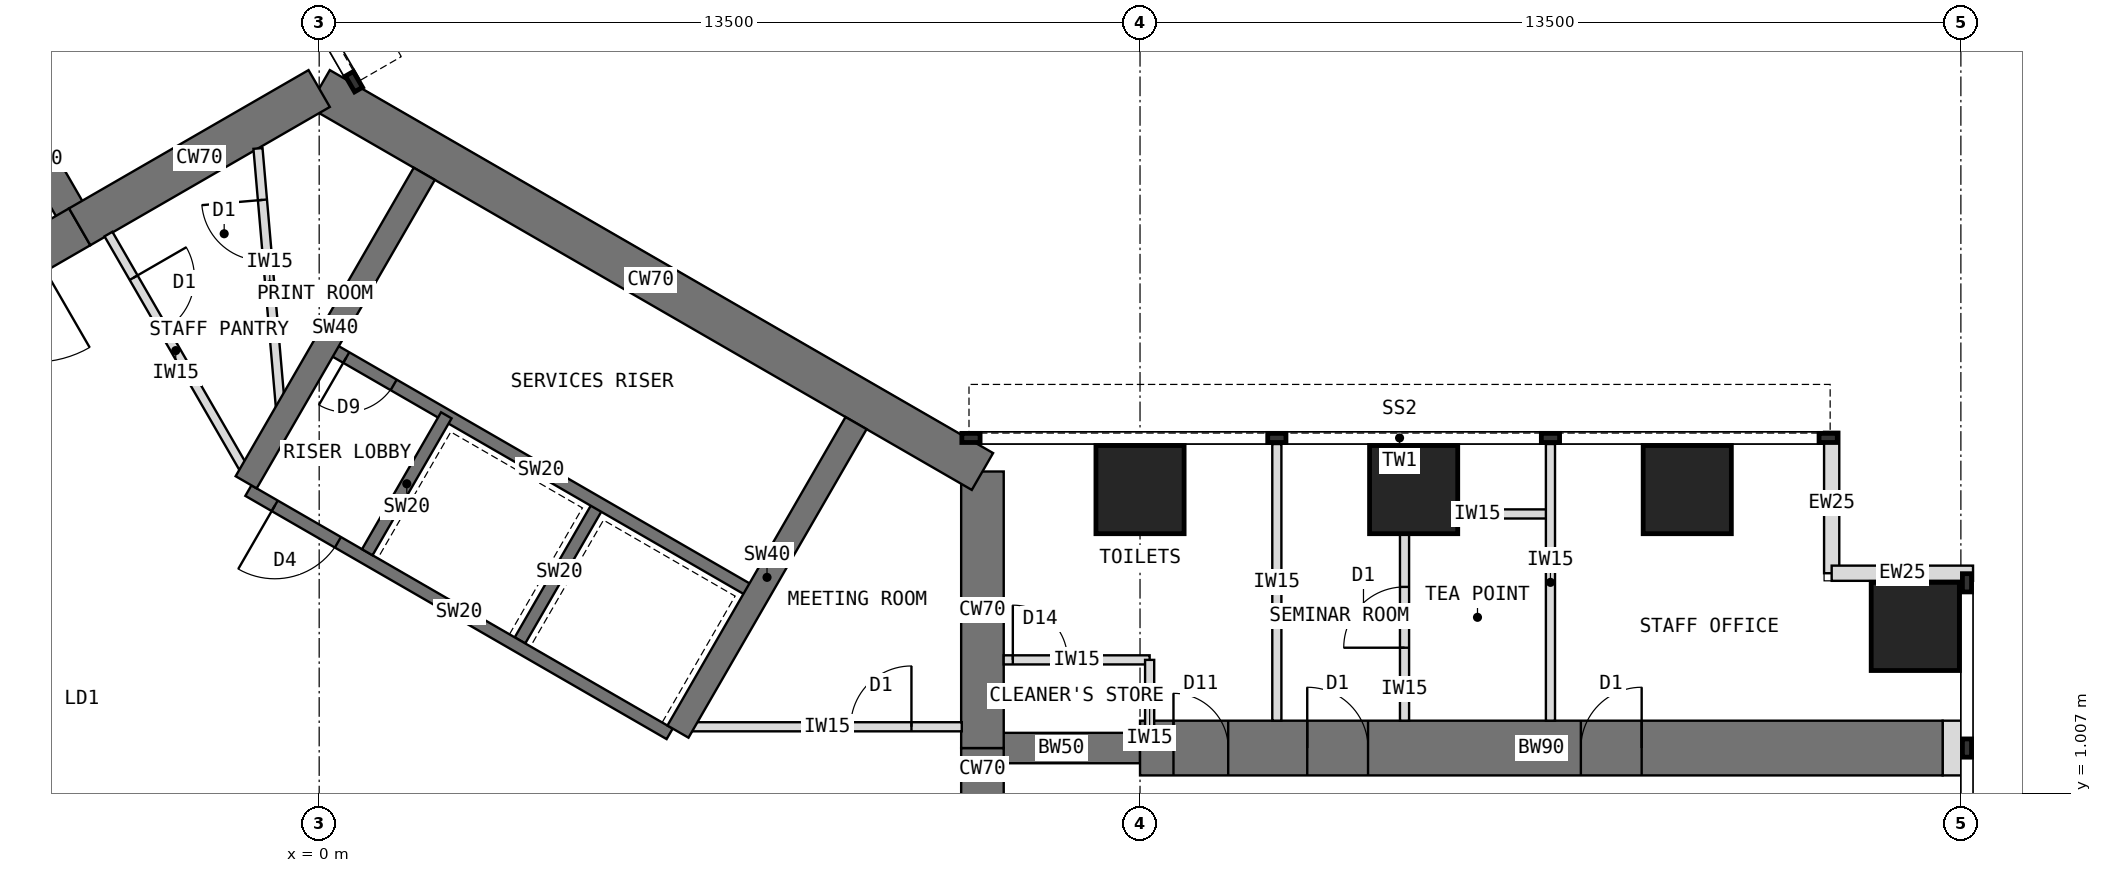
"""IFC4 building model, lengths in metres.
Left out: names, types, materials, properties, quantities, classifications, styles, units other than length and angle.
Written with IfcOpenShell. Run it as: python <this file> out.ifc"""

import sys

from ifc_helpers import new_model, si_unit, direction, frame, frame_2d, origin, origin_2d, place, context, subcontext, project, spatial, rectangle, extrude, element, fill, save


model = new_model("IFC4")
c1 = context("Model", 3, precision=1e-05, world=origin(), true_north=direction((0.0, 1.0)))
c2 = subcontext(c1, "Body", "Model", "MODEL_VIEW")
j1 = project(units=[si_unit("LENGTHUNIT", "METRE"), si_unit("PLANEANGLEUNIT", "RADIAN")], contexts=[c1])
p1 = place(None, origin())
s1 = spatial("IfcSite", under=j1, at=p1, CompositionType="ELEMENT")
p2 = place(p1, origin())
s2 = spatial("IfcBuilding", under=s1, at=p2, CompositionType="ELEMENT")
p3 = place(p2, frame((0.0, 0.0, 60.5)))
s3 = spatial("IfcBuildingStorey", under=s2, at=p3, CompositionType="ELEMENT", Elevation=60.5)
p4 = place(p3, frame((10.908, -1.75, 0.0), z_axis=(0.0, 0.0, 1.0), x_axis=(0.0, 1.0, 0.0)))
e1 = element("IfcWall", 1, at=p4, inside=s3, PredefinedType="SHEAR", context=c2, shape_type="SweptSolid", body=[
    extrude(rectangle(XDim=3.5, YDim=0.7, at=frame_2d((1.75, 0.0))), origin(), (0.0, 0.0, 1.0), 4.0),
])
p5 = place(p4, frame((0.85, 0.0, 0.0)))
e2 = element("IfcOpeningElement", 2, at=p5, cuts=e1, PredefinedType="OPENING", context=c2, shape_type="SweptSolid", body=[
    extrude(rectangle(XDim=1.8, YDim=2.1, at=frame_2d((0.9, 1.05))), frame((0.0, 0.36, 0.0), z_axis=(0.0, -1.0, 0.0), x_axis=(1.0, 0.0, 0.0)), (0.0, 0.0, 1.0), 0.72),
])
p6 = place(p3, frame((10.908, 1.75, 0.0), z_axis=(0.0, 0.0, 1.0), x_axis=(0.0, 1.0, 0.0)))
e3 = element("IfcWall", 3, at=p6, inside=s3, PredefinedType="SHEAR", context=c2, shape_type="SweptSolid", body=[
    extrude(rectangle(XDim=4.548, YDim=0.7, at=frame_2d((2.274, 0.0))), origin(), (0.0, 0.0, 1.0), 4.0),
])
p7 = place(p3, frame((10.908, 6.298, 0.0), z_axis=(0.0, 0.0, 1.0), x_axis=(-0.866021940709, 0.500005998175, 0.0)))
e4 = element("IfcWall", 4, at=p7, inside=s3, PredefinedType="SHEAR", context=c2, shape_type="SweptSolid", body=[
    extrude(rectangle(XDim=12.596, YDim=0.7, at=frame_2d((6.298, 0.0))), origin(), (0.0, 0.0, 1.0), 4.0),
])
p8 = place(p3, frame((0.0, 12.596, 0.0), z_axis=(0.0, 0.0, 1.0), x_axis=(-0.866011268655, -0.500024481964, 0.0)))
e5 = element("IfcWall", 5, at=p8, inside=s3, PredefinedType="SHEAR", context=c2, shape_type="SweptSolid", body=[
    extrude(rectangle(XDim=4.548, YDim=0.7, at=frame_2d((2.274, 0.0))), origin(), (0.0, 0.0, 1.0), 4.0),
])
p9 = place(p3, frame((-3.939, 10.322, 0.0), z_axis=(0.0, 0.0, 1.0), x_axis=(-0.866019471182, -0.500010275428, 0.0)))
e6 = element("IfcWall", 6, at=p9, inside=s3, PredefinedType="SHEAR", context=c2, shape_type="SweptSolid", body=[
    extrude(rectangle(XDim=3.5, YDim=0.7, at=frame_2d((1.75, 0.0))), origin(), (0.0, 0.0, 1.0), 4.0),
])
p10 = place(p9, frame((0.85, 0.0, 0.0)))
e7 = element("IfcOpeningElement", 7, at=p10, cuts=e6, PredefinedType="OPENING", context=c2, shape_type="SweptSolid", body=[
    extrude(rectangle(XDim=1.8, YDim=2.1, at=frame_2d((0.9, 1.05))), frame((0.0, 0.36, 0.0), z_axis=(0.0, -1.0, 0.0), x_axis=(1.0, 0.0, 0.0)), (0.0, 0.0, 1.0), 0.72),
])
p11 = place(p3, frame((10.908, 1.75, 0.0), z_axis=(0.0, 0.0, 1.0), x_axis=(1.0, 0.0, 0.0)))
e8 = element("IfcWall", 8, at=p11, inside=s3, PredefinedType="SHEAR", context=c2, shape_type="SweptSolid", body=[
    extrude(rectangle(XDim=2.592, YDim=0.5, at=frame_2d((1.296, 0.0))), origin(), (0.0, 0.0, 1.0), 4.0),
])
p12 = place(p3, frame((13.5, 1.75, 0.0), z_axis=(0.0, 0.0, 1.0), x_axis=(1.0, 0.0, 0.0)))
e9 = element("IfcWall", 9, at=p12, inside=s3, PredefinedType="SHEAR", context=c2, shape_type="SweptSolid", body=[
    extrude(rectangle(XDim=13.2, YDim=0.9, at=frame_2d((6.6, 0.0))), origin(), (0.0, 0.0, 1.0), 4.0),
])
p13 = place(p12, frame((0.55, 0.0, 0.0)))
e10 = element("IfcOpeningElement", 10, at=p13, cuts=e9, PredefinedType="OPENING", context=c2, shape_type="SweptSolid", body=[
    extrude(rectangle(XDim=0.9, YDim=2.1, at=frame_2d((0.45, 1.05))), frame((0.0, 0.46, 0.0), z_axis=(0.0, -1.0, 0.0), x_axis=(1.0, 0.0, 0.0)), (0.0, 0.0, 1.0), 0.92),
])
p14 = place(p12, frame((2.75, 0.0, 0.0)))
e11 = element("IfcOpeningElement", 11, at=p14, cuts=e9, PredefinedType="OPENING", context=c2, shape_type="SweptSolid", body=[
    extrude(rectangle(XDim=1.0, YDim=2.1, at=frame_2d((0.5, 1.05))), frame((0.0, 0.46, 0.0), z_axis=(0.0, -1.0, 0.0), x_axis=(1.0, 0.0, 0.0)), (0.0, 0.0, 1.0), 0.92),
])
p15 = place(p12, frame((7.25, 0.0, 0.0)))
e12 = element("IfcOpeningElement", 12, at=p15, cuts=e9, PredefinedType="OPENING", context=c2, shape_type="SweptSolid", body=[
    extrude(rectangle(XDim=1.0, YDim=2.1, at=frame_2d((0.5, 1.05))), frame((0.0, 0.46, 0.0), z_axis=(0.0, -1.0, 0.0), x_axis=(1.0, 0.0, 0.0)), (0.0, 0.0, 1.0), 0.92),
])
p16 = place(p3, frame((-3.939, 10.322, 0.0), z_axis=(0.0, 0.0, 1.0), x_axis=(-0.499918158782, 0.866072649678, 0.0)))
e13 = element("IfcWall", 13, at=p16, inside=s3, PredefinedType="SHEAR", context=c2, shape_type="SweptSolid", body=[
    extrude(rectangle(XDim=2.592, YDim=0.5, at=frame_2d((1.296, 0.0))), origin(), (0.0, 0.0, 1.0), 4.0),
])
for number, where, z_axis, x_axis in (
    (14, (13.5, 6.0, 0.0), (0.0, 0.0, 1.0), (1.0, 0.0, 0.0)),
    (15, (18.0, 6.0, 0.0), (0.0, 0.0, 1.0), (1.0, 0.0, 0.0)),
    (16, (22.5, 6.0, 0.0), (0.0, 0.0, 1.0), (1.0, 0.0, 0.0)),
    (17, (26.25, 3.75, 0.0), (0.0, 0.0, 1.0), (1.0, 0.0, 0.0)),
):
    element("IfcColumn", number, at=place(p3, frame(where, z_axis=z_axis, x_axis=x_axis)), inside=s3, PredefinedType="COLUMN", context=c2, shape_type="SweptSolid", body=[
        extrude(rectangle(XDim=1.45, YDim=1.45, at=origin_2d()), origin(), (0.0, 0.0, 1.0), 4.0),
    ])
for number, where, z_axis, x_axis in (
    (18, (24.875, 6.95, 0.0), (0.0, 0.0, 1.0), (0.0, -1.0, 0.0)),
    (19, (24.875, 4.625, 0.0), (0.0, 0.0, 1.0), (1.0, 0.0, 0.0)),
):
    element("IfcWall", number, at=place(p3, frame(where, z_axis=z_axis, x_axis=x_axis)), inside=s3, PredefinedType="STANDARD", context=c2, shape_type="SweptSolid", body=[
        extrude(rectangle(XDim=2.325, YDim=0.25, at=frame_2d((1.163, 0.0))), origin(), (0.0, 0.0, 1.0), 3.8),
    ])
p17 = place(p3, frame((26.7, 1.75, 0.0), z_axis=(0.0, 0.0, 1.0), x_axis=(1.0, 0.0, 0.0)))
e20 = element("IfcWall", 20, at=p17, inside=s3, PredefinedType="PARTITIONING", context=c2, shape_type="SweptSolid", body=[
    extrude(rectangle(XDim=0.31, YDim=0.9, at=frame_2d((0.155, 0.0))), origin(), (0.0, 0.0, 1.0), 3.8),
])
p18 = place(p3, frame((5.764, 1.984, 0.0), z_axis=(0.0, 0.0, 1.0), x_axis=(-0.866026010844, 0.49999894854, 0.0)))
e21 = element("IfcWall", 21, at=p18, inside=s3, PredefinedType="SHEAR", context=c2, shape_type="SweptSolid", body=[
    extrude(rectangle(XDim=8.0, YDim=0.2, at=frame_2d((4.0, 0.0))), origin(), (0.0, 0.0, 1.0), 4.0),
])
p19 = place(p18, frame((6.3, 0.0, 0.0)))
e22 = element("IfcOpeningElement", 22, at=p19, cuts=e21, PredefinedType="OPENING", context=c2, shape_type="SweptSolid", body=[
    extrude(rectangle(XDim=1.2, YDim=2.1, at=frame_2d((0.6, 1.05))), frame((0.0, 0.11, 0.0), z_axis=(0.0, -1.0, 0.0), x_axis=(1.0, 0.0, 0.0)), (0.0, 0.0, 1.0), 0.22),
])
for number, where, z_axis, x_axis in (
    (23, (3.303, 3.52, 0.0), (0.0, 0.0, 1.0), (0.5, 0.866, 0.0)),
    (24, (0.791, 4.97, 0.0), (0.0, 0.0, 1.0), (0.5, 0.866, 0.0)),
):
    element("IfcWall", number, at=place(p3, frame(where, z_axis=z_axis, x_axis=x_axis)), inside=s3, PredefinedType="SHEAR", context=c2, shape_type="SweptSolid", body=[
        extrude(rectangle(XDim=2.6, YDim=0.2, at=frame_2d((1.3, 0.0))), origin(), (0.0, 0.0, 1.0), 4.0),
    ])
p20 = place(p3, frame((7.114, 4.322, 0.0), z_axis=(0.0, 0.0, 1.0), x_axis=(-0.866026010844, 0.49999894854, 0.0)))
e25 = element("IfcWall", 25, at=p20, inside=s3, PredefinedType="SHEAR", context=c2, shape_type="SweptSolid", body=[
    extrude(rectangle(XDim=8.0, YDim=0.2, at=frame_2d((4.0, 0.0))), origin(), (0.0, 0.0, 1.0), 4.0),
])
p21 = place(p20, frame((6.8, 0.0, 0.0)))
e26 = element("IfcOpeningElement", 26, at=p21, cuts=e25, PredefinedType="OPENING", context=c2, shape_type="SweptSolid", body=[
    extrude(rectangle(XDim=0.9, YDim=2.1, at=frame_2d((0.45, 1.05))), frame((0.0, 0.11, 0.0), z_axis=(0.0, -1.0, 0.0), x_axis=(1.0, 0.0, 0.0)), (0.0, 0.0, 1.0), 0.22),
])
for number, where, z_axis, x_axis in (
    (27, (-1.201, 6.12, 0.0), (0.0, 0.0, 1.0), (0.5, 0.866, 0.0)),
    (28, (5.901, 2.02, 0.0), (0.0, 0.0, 1.0), (0.5, 0.866, 0.0)),
):
    element("IfcWall", number, at=place(p3, frame(where, z_axis=z_axis, x_axis=x_axis)), inside=s3, PredefinedType="SHEAR", context=c2, shape_type="SweptSolid", body=[
        extrude(rectangle(XDim=5.858, YDim=0.4, at=frame_2d((2.929, 0.0))), origin(), (0.0, 0.0, 1.0), 4.0),
    ])
for number, where, z_axis, x_axis in (
    (29, (15.75, 2.2, 0.0), (0.0, 0.0, 1.0), (0.0, 1.0, 0.0)),
    (30, (20.25, 2.2, 0.0), (0.0, 0.0, 1.0), (0.0, 1.0, 0.0)),
):
    element("IfcWall", number, at=place(p3, frame(where, z_axis=z_axis, x_axis=x_axis)), inside=s3, PredefinedType="PARTITIONING", context=c2, shape_type="SweptSolid", body=[
        extrude(rectangle(XDim=4.55, YDim=0.15, at=frame_2d((2.275, 0.0))), origin(), (0.0, 0.0, 1.0), 3.8),
    ])
p22 = place(p3, frame((17.85, 5.6, 0.0), z_axis=(0.0, 0.0, 1.0), x_axis=(1.0, 0.0, 0.0)))
e31 = element("IfcWall", 31, at=p22, inside=s3, PredefinedType="PARTITIONING", context=c2, shape_type="SweptSolid", body=[
    extrude(rectangle(XDim=2.4, YDim=0.15, at=frame_2d((1.2, 0.0))), origin(), (0.0, 0.0, 1.0), 3.8),
])
p23 = place(p3, frame((17.85, 2.2, 0.0), z_axis=(0.0, 0.0, 1.0), x_axis=(0.0, 1.0, 0.0)))
e32 = element("IfcWall", 32, at=p23, inside=s3, PredefinedType="PARTITIONING", context=c2, shape_type="SweptSolid", body=[
    extrude(rectangle(XDim=3.4, YDim=0.15, at=frame_2d((1.7, 0.0))), origin(), (0.0, 0.0, 1.0), 3.8),
])
p24 = place(p23, frame((1.2, 0.0, 0.0)))
e33 = element("IfcOpeningElement", 33, at=p24, cuts=e32, PredefinedType="OPENING", context=c2, shape_type="SweptSolid", body=[
    extrude(rectangle(XDim=1.0, YDim=2.1, at=frame_2d((0.5, 1.05))), frame((0.0, 0.085, 0.0), z_axis=(0.0, -1.0, 0.0), x_axis=(1.0, 0.0, 0.0)), (0.0, 0.0, 1.0), 0.17),
])
p25 = place(p3, frame((11.258, 3.2, 0.0), z_axis=(0.0, 0.0, 1.0), x_axis=(1.0, 0.0, 0.0)))
e34 = element("IfcWall", 34, at=p25, inside=s3, PredefinedType="PARTITIONING", context=c2, shape_type="SweptSolid", body=[
    extrude(rectangle(XDim=2.4, YDim=0.15, at=frame_2d((1.2, 0.0))), origin(), (0.0, 0.0, 1.0), 3.8),
])
p26 = place(p25, frame((0.15, 0.0, 0.0)))
e35 = element("IfcOpeningElement", 35, at=p26, cuts=e34, PredefinedType="OPENING", context=c2, shape_type="SweptSolid", body=[
    extrude(rectangle(XDim=0.9, YDim=2.1, at=frame_2d((0.45, 1.05))), frame((0.0, 0.085, 0.0), z_axis=(0.0, -1.0, 0.0), x_axis=(1.0, 0.0, 0.0)), (0.0, 0.0, 1.0), 0.17),
])
p27 = place(p3, frame((13.658, 2.0, 0.0), z_axis=(0.0, 0.0, 1.0), x_axis=(0.0, 1.0, 0.0)))
e36 = element("IfcWall", 36, at=p27, inside=s3, PredefinedType="PARTITIONING", context=c2, shape_type="SweptSolid", body=[
    extrude(rectangle(XDim=1.2, YDim=0.15, at=frame_2d((0.6, 0.0))), origin(), (0.0, 0.0, 1.0), 3.8),
])
p28 = place(p3, frame((-3.466, 10.202, 0.0), z_axis=(0.0, 0.0, 1.0), x_axis=(0.500007369519, -0.866021148949, 0.0)))
e37 = element("IfcWall", 37, at=p28, inside=s3, PredefinedType="PARTITIONING", context=c2, shape_type="SweptSolid", body=[
    extrude(rectangle(XDim=4.426, YDim=0.15, at=frame_2d((2.213, 0.0))), origin(), (0.0, 0.0, 1.0), 3.8),
])
p29 = place(p28, frame((0.828, 0.0, 0.0)))
e38 = element("IfcOpeningElement", 38, at=p29, cuts=e37, PredefinedType="OPENING", context=c2, shape_type="SweptSolid", body=[
    extrude(rectangle(XDim=1.0, YDim=2.1, at=frame_2d((0.5, 1.05))), frame((0.0, 0.085, 0.0), z_axis=(0.0, -1.0, 0.0), x_axis=(1.0, 0.0, 0.0)), (0.0, 0.0, 1.0), 0.17),
])
p30 = place(p3, frame((6.143, 2.1, 0.0), z_axis=(0.0, 0.0, 1.0), x_axis=(1.0, 0.0, 0.0)))
e39 = element("IfcWall", 39, at=p30, inside=s3, PredefinedType="PARTITIONING", context=c2, shape_type="SweptSolid", body=[
    extrude(rectangle(XDim=4.426, YDim=0.15, at=frame_2d((2.213, 0.0))), origin(), (0.0, 0.0, 1.0), 3.8),
])
p31 = place(p30, frame((2.598, 0.0, 0.0)))
e40 = element("IfcOpeningElement", 40, at=p31, cuts=e39, PredefinedType="OPENING", context=c2, shape_type="SweptSolid", body=[
    extrude(rectangle(XDim=1.0, YDim=2.1, at=frame_2d((0.5, 1.05))), frame((0.0, 0.085, 0.0), z_axis=(0.0, -1.0, 0.0), x_axis=(1.0, 0.0, 0.0)), (0.0, 0.0, 1.0), 0.17),
])
p32 = place(p3, frame((-0.618, 7.129, 0.0), z_axis=(0.0, 0.0, 1.0), x_axis=(-0.086409450071, 0.996259708579, 0.0)))
e41 = element("IfcWall", 41, at=p32, inside=s3, PredefinedType="PARTITIONING", context=c2, shape_type="SweptSolid", body=[
    extrude(rectangle(XDim=4.498, YDim=0.15, at=frame_2d((2.249, 0.0))), origin(), (0.0, 0.0, 1.0), 3.8),
])
p33 = place(p32, frame((2.648, 0.0, 0.0)))
e42 = element("IfcOpeningElement", 42, at=p33, cuts=e41, PredefinedType="OPENING", context=c2, shape_type="SweptSolid", body=[
    extrude(rectangle(XDim=1.0, YDim=2.1, at=frame_2d((0.5, 1.05))), frame((0.0, 0.085, 0.0), z_axis=(0.0, -1.0, 0.0), x_axis=(1.0, 0.0, 0.0)), (0.0, 0.0, 1.0), 0.17),
])
p34 = place(p19, origin())
e43 = element("IfcDoor", 43, at=p34, inside=s3, OperationType="SINGLE_SWING_RIGHT", PredefinedType="DOOR", context=c2, shape_type="SweptSolid", body=[
    extrude(rectangle(XDim=1.2, YDim=2.1, at=frame_2d((0.6, 1.05))), frame((0.0, 0.025, 0.0), z_axis=(0.0, -1.0, 0.0), x_axis=(1.0, 0.0, 0.0)), (0.0, 0.0, 1.0), 0.05),
])
fill(e22, e43)
p35 = place(p21, origin())
e44 = element("IfcDoor", 44, at=p35, inside=s3, OperationType="SINGLE_SWING_RIGHT", PredefinedType="DOOR", context=c2, shape_type="SweptSolid", body=[
    extrude(rectangle(XDim=0.9, YDim=2.1, at=frame_2d((0.45, 1.05))), frame((0.0, 0.025, 0.0), z_axis=(0.0, -1.0, 0.0), x_axis=(1.0, 0.0, 0.0)), (0.0, 0.0, 1.0), 0.05),
])
fill(e26, e44)
p36 = place(p24, origin())
e45 = element("IfcDoor", 45, at=p36, inside=s3, OperationType="SINGLE_SWING_LEFT", PredefinedType="DOOR", context=c2, shape_type="SweptSolid", body=[
    extrude(rectangle(XDim=1.0, YDim=2.1, at=frame_2d((0.5, 1.05))), frame((0.0, 0.025, 0.0), z_axis=(0.0, -1.0, 0.0), x_axis=(1.0, 0.0, 0.0)), (0.0, 0.0, 1.0), 0.05),
])
fill(e33, e45)
p37 = place(p26, origin())
e46 = element("IfcDoor", 46, at=p37, inside=s3, OperationType="SINGLE_SWING_LEFT", PredefinedType="DOOR", context=c2, shape_type="SweptSolid", body=[
    extrude(rectangle(XDim=0.9, YDim=2.1, at=frame_2d((0.45, 1.05))), frame((0.0, 0.025, 0.0), z_axis=(0.0, -1.0, 0.0), x_axis=(1.0, 0.0, 0.0)), (0.0, 0.0, 1.0), 0.05),
])
fill(e35, e46)
p38 = place(p31, origin())
e47 = element("IfcDoor", 47, at=p38, inside=s3, OperationType="SINGLE_SWING_RIGHT", PredefinedType="DOOR", context=c2, shape_type="SweptSolid", body=[
    extrude(rectangle(XDim=1.0, YDim=2.1, at=frame_2d((0.5, 1.05))), frame((0.0, 0.025, 0.0), z_axis=(0.0, -1.0, 0.0), x_axis=(1.0, 0.0, 0.0)), (0.0, 0.0, 1.0), 0.05),
])
fill(e40, e47)
p39 = place(p29, origin())
e48 = element("IfcDoor", 48, at=p39, inside=s3, OperationType="SINGLE_SWING_LEFT", PredefinedType="DOOR", context=c2, shape_type="SweptSolid", body=[
    extrude(rectangle(XDim=1.0, YDim=2.1, at=frame_2d((0.5, 1.05))), frame((0.0, 0.025, 0.0), z_axis=(0.0, -1.0, 0.0), x_axis=(1.0, 0.0, 0.0)), (0.0, 0.0, 1.0), 0.05),
])
fill(e38, e48)
p40 = place(p33, origin())
e49 = element("IfcDoor", 49, at=p40, inside=s3, OperationType="SINGLE_SWING_RIGHT", PredefinedType="DOOR", context=c2, shape_type="SweptSolid", body=[
    extrude(rectangle(XDim=1.0, YDim=2.1, at=frame_2d((0.5, 1.05))), frame((0.0, 0.025, 0.0), z_axis=(0.0, -1.0, 0.0), x_axis=(1.0, 0.0, 0.0)), (0.0, 0.0, 1.0), 0.05),
])
fill(e42, e49)
p41 = place(p13, origin())
e50 = element("IfcDoor", 50, at=p41, inside=s3, OperationType="SINGLE_SWING_LEFT", PredefinedType="DOOR", context=c2, shape_type="SweptSolid", body=[
    extrude(rectangle(XDim=0.82, YDim=2.06, at=frame_2d((0.45, 1.03))), frame((0.0, 0.025, 0.0), z_axis=(0.0, -1.0, 0.0), x_axis=(1.0, 0.0, 0.0)), (0.0, 0.0, 1.0), 0.05),
    extrude(rectangle(XDim=0.04, YDim=2.1, at=frame_2d((0.02, 1.05))), frame((0.0, 0.45, 0.0), z_axis=(0.0, -1.0, 0.0), x_axis=(1.0, 0.0, 0.0)), (0.0, 0.0, 1.0), 0.899),
    extrude(rectangle(XDim=0.04, YDim=2.1, at=frame_2d((0.88, 1.05))), frame((0.0, 0.45, 0.0), z_axis=(0.0, -1.0, 0.0), x_axis=(1.0, 0.0, 0.0)), (0.0, 0.0, 1.0), 0.899),
    extrude(rectangle(XDim=0.82, YDim=0.04, at=frame_2d((0.45, 2.08))), frame((0.0, 0.45, 0.0), z_axis=(0.0, -1.0, 0.0), x_axis=(1.0, 0.0, 0.0)), (0.0, 0.0, 1.0), 0.899),
])
fill(e10, e50)
p42 = place(p14, origin())
e51 = element("IfcDoor", 51, at=p42, inside=s3, OperationType="SINGLE_SWING_LEFT", PredefinedType="DOOR", context=c2, shape_type="SweptSolid", body=[
    extrude(rectangle(XDim=0.92, YDim=2.06, at=frame_2d((0.5, 1.03))), frame((0.0, 0.025, 0.0), z_axis=(0.0, -1.0, 0.0), x_axis=(1.0, 0.0, 0.0)), (0.0, 0.0, 1.0), 0.05),
    extrude(rectangle(XDim=0.04, YDim=2.1, at=frame_2d((0.02, 1.05))), frame((0.0, 0.45, 0.0), z_axis=(0.0, -1.0, 0.0), x_axis=(1.0, 0.0, 0.0)), (0.0, 0.0, 1.0), 0.899),
    extrude(rectangle(XDim=0.04, YDim=2.1, at=frame_2d((0.98, 1.05))), frame((0.0, 0.45, 0.0), z_axis=(0.0, -1.0, 0.0), x_axis=(1.0, 0.0, 0.0)), (0.0, 0.0, 1.0), 0.899),
    extrude(rectangle(XDim=0.92, YDim=0.04, at=frame_2d((0.5, 2.08))), frame((0.0, 0.45, 0.0), z_axis=(0.0, -1.0, 0.0), x_axis=(1.0, 0.0, 0.0)), (0.0, 0.0, 1.0), 0.899),
])
fill(e11, e51)
p43 = place(p15, origin())
e52 = element("IfcDoor", 52, at=p43, inside=s3, OperationType="SINGLE_SWING_RIGHT", PredefinedType="DOOR", context=c2, shape_type="SweptSolid", body=[
    extrude(rectangle(XDim=0.92, YDim=2.06, at=frame_2d((0.5, 1.03))), frame((0.0, 0.025, 0.0), z_axis=(0.0, -1.0, 0.0), x_axis=(1.0, 0.0, 0.0)), (0.0, 0.0, 1.0), 0.05),
    extrude(rectangle(XDim=0.04, YDim=2.1, at=frame_2d((0.02, 1.05))), frame((0.0, 0.45, 0.0), z_axis=(0.0, -1.0, 0.0), x_axis=(1.0, 0.0, 0.0)), (0.0, 0.0, 1.0), 0.899),
    extrude(rectangle(XDim=0.04, YDim=2.1, at=frame_2d((0.98, 1.05))), frame((0.0, 0.45, 0.0), z_axis=(0.0, -1.0, 0.0), x_axis=(1.0, 0.0, 0.0)), (0.0, 0.0, 1.0), 0.899),
    extrude(rectangle(XDim=0.92, YDim=0.04, at=frame_2d((0.5, 2.08))), frame((0.0, 0.45, 0.0), z_axis=(0.0, -1.0, 0.0), x_axis=(1.0, 0.0, 0.0)), (0.0, 0.0, 1.0), 0.899),
])
fill(e12, e52)
save(model, sys.argv[1])
